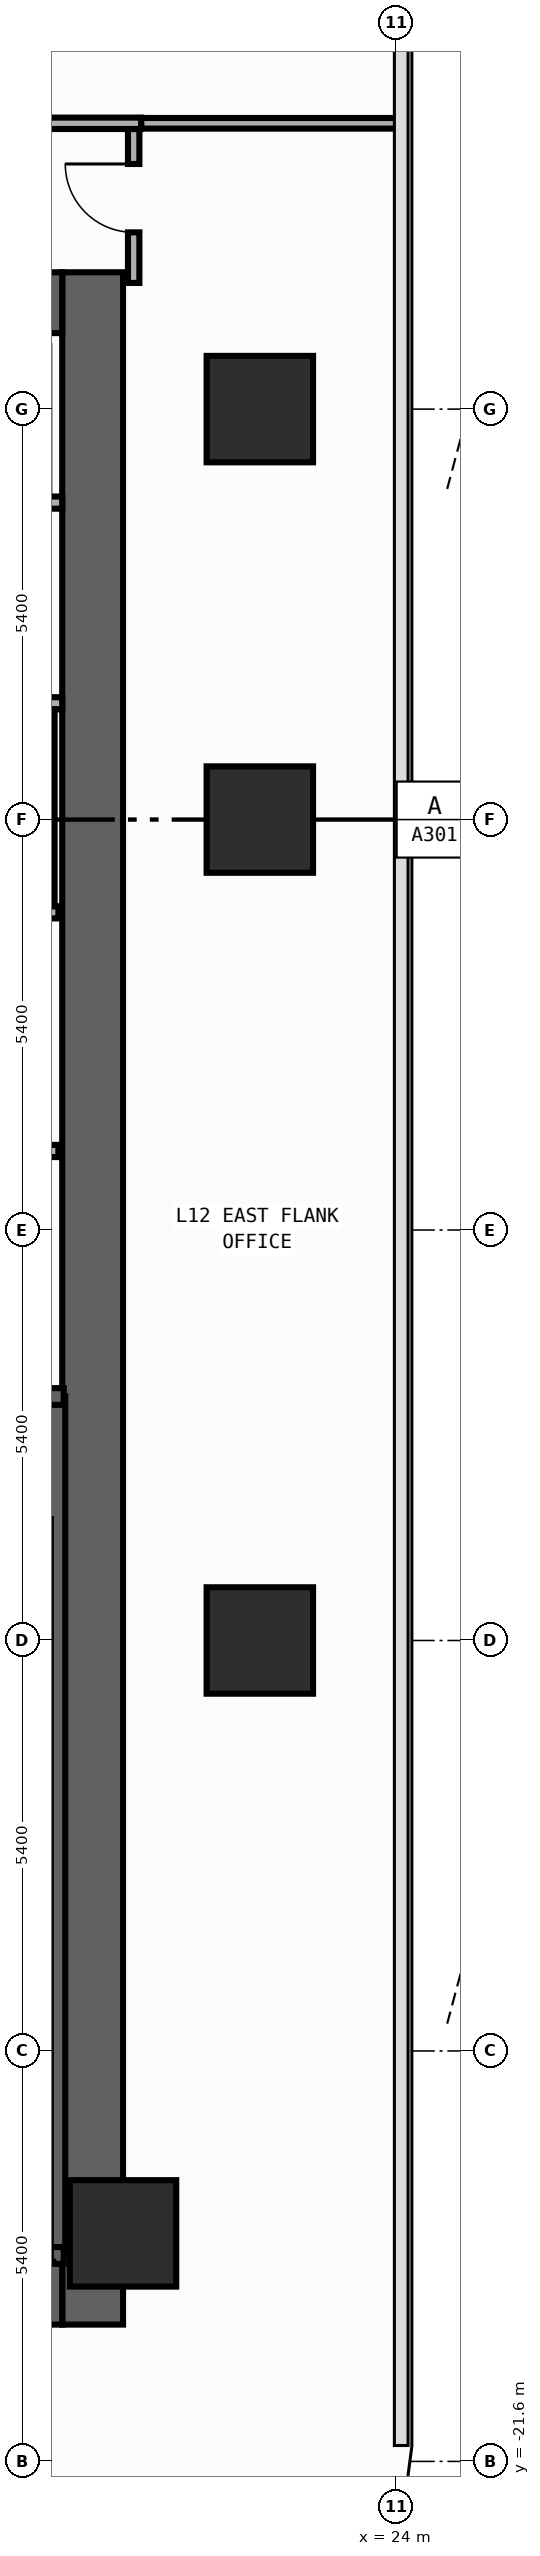
"""IFC4 building model, lengths in metres.
Left out: names, types, materials, properties, quantities, classifications, styles, units other than length and angle.
Written with IfcOpenShell. Run it as: python <this file> out.ifc"""

import sys

from ifc_helpers import new_model, si_unit, direction, frame, frame_2d, origin, origin_2d, place, context, subcontext, project, spatial, rectangle, extrude, element, fill, save


model = new_model("IFC4")
c1 = context("Model", 3, precision=1e-05, world=origin(), true_north=direction((0.0, 1.0)))
c2 = subcontext(c1, "Body", "Model", "MODEL_VIEW")
j1 = project(units=[si_unit("LENGTHUNIT", "METRE"), si_unit("PLANEANGLEUNIT", "RADIAN")], contexts=[c1])
p1 = place(None, origin())
s1 = spatial("IfcSite", under=j1, at=p1, CompositionType="ELEMENT")
p2 = place(p1, origin())
s2 = spatial("IfcBuilding", under=s1, at=p2, CompositionType="ELEMENT")
p3 = place(p2, frame((0.0, 0.0, 51.2)))
s3 = spatial("IfcBuildingStorey", under=s2, at=p3, CompositionType="ELEMENT", Elevation=51.2)
p4 = place(p3, frame((20.0, -19.8, 0.0), z_axis=(0.0, 0.0, 1.0), x_axis=(0.0, 1.0, 0.0)))
e1 = element("IfcWall", 1, at=p4, inside=s3, PredefinedType="SHEAR", context=c2, shape_type="SweptSolid", body=[
    extrude(rectangle(XDim=27.0, YDim=0.8, at=frame_2d((13.5, 0.0))), origin(), (0.0, 0.0, 1.0), 3.94),
])
for number, where, z_axis, x_axis in (
    (2, (12.8, -19.4, 0.0), (0.0, 0.0, 1.0), (1.0, 0.0, 0.0)),
    (3, (12.8, 6.8, 0.0), (0.0, 0.0, 1.0), (1.0, 0.0, 0.0)),
):
    element("IfcWall", number, at=place(p3, frame(where, z_axis=z_axis, x_axis=x_axis)), inside=s3, PredefinedType="SHEAR", context=c2, shape_type="SweptSolid", body=[
        extrude(rectangle(XDim=6.8, YDim=0.8, at=frame_2d((3.4, 0.0))), origin(), (0.0, 0.0, 1.0), 3.94),
    ])
p5 = place(p3, frame((19.53, -18.89, 0.0), z_axis=(0.0, 0.0, 1.0), x_axis=(0.0, 1.0, 0.0)))
e4 = element("IfcWall", 4, at=p5, inside=s3, PredefinedType="SHEAR", context=c2, shape_type="SweptSolid", body=[
    extrude(rectangle(XDim=11.3, YDim=0.22, at=frame_2d((5.65, 0.0))), origin(), (0.0, 0.0, 1.0), 3.94),
])
p6 = place(p3, frame((15.705, -18.89, 0.0), z_axis=(0.0, 0.0, 1.0), x_axis=(1.0, 0.0, 0.0)))
e5 = element("IfcWall", 5, at=p6, inside=s3, PredefinedType="SHEAR", context=c2, shape_type="SweptSolid", body=[
    extrude(rectangle(XDim=3.915, YDim=0.22, at=frame_2d((1.958, 0.0))), origin(), (0.0, 0.0, 1.0), 3.94),
])
p7 = place(p3, frame((19.62, -7.59, 0.0), z_axis=(0.0, 0.0, 1.0), x_axis=(-1.0, 0.0, 0.0)))
e6 = element("IfcWall", 6, at=p7, inside=s3, PredefinedType="SHEAR", context=c2, shape_type="SweptSolid", body=[
    extrude(rectangle(XDim=3.915, YDim=0.22, at=frame_2d((1.958, 0.0))), origin(), (0.0, 0.0, 1.0), 3.94),
])
p8 = place(p7, frame((1.08, 0.0, 0.0)))
e7 = element("IfcOpeningElement", 7, at=p8, cuts=e6, PredefinedType="OPENING", context=c2, shape_type="SweptSolid", body=[
    extrude(rectangle(XDim=1.1, YDim=2.2, at=frame_2d((0.55, 1.1))), frame((0.0, 0.12, 0.0), z_axis=(0.0, -1.0, 0.0), x_axis=(1.0, 0.0, 0.0)), (0.0, 0.0, 1.0), 0.24),
])
for number, where, z_axis, x_axis in (
    (8, (20.4, -18.6, 0.0), (0.0, 0.0, 1.0), (1.0, 0.0, 0.0)),
    (9, (22.2, -10.8, 0.0), (0.0, 0.0, 1.0), (1.0, 0.0, 0.0)),
    (10, (22.2, 0.0, 0.0), (0.0, 0.0, 1.0), (1.0, 0.0, 0.0)),
    (11, (22.2, 5.4, 0.0), (0.0, 0.0, 1.0), (1.0, 0.0, 0.0)),
):
    element("IfcColumn", number, at=place(p3, frame(where, z_axis=z_axis, x_axis=x_axis)), inside=s3, PredefinedType="COLUMN", context=c2, shape_type="SweptSolid", body=[
        extrude(rectangle(XDim=1.4, YDim=1.4, at=origin_2d()), origin(), (0.0, 0.0, 1.0), 4.2),
    ])
p9 = place(p3, frame((15.75, -4.36, 0.0), z_axis=(0.0, 0.0, 1.0), x_axis=(1.0, 0.0, 0.0)))
e12 = element("IfcWall", 12, at=p9, inside=s3, PredefinedType="STANDARD", context=c2, shape_type="SweptSolid", body=[
    extrude(rectangle(XDim=3.8, YDim=0.16, at=frame_2d((1.9, 0.0))), origin(), (0.0, 0.0, 1.0), 3.94),
])
p10 = place(p9, frame((1.47, 0.0, 0.0)))
e13 = element("IfcOpeningElement", 13, at=p10, cuts=e12, PredefinedType="OPENING", context=c2, shape_type="SweptSolid", body=[
    extrude(rectangle(XDim=1.15, YDim=2.2, at=frame_2d((0.575, 1.1))), frame((0.0, 0.09, 0.0), z_axis=(0.0, -1.0, 0.0), x_axis=(1.0, 0.0, 0.0)), (0.0, 0.0, 1.0), 0.18),
])
p11 = place(p3, frame((15.75, -1.22, 0.0), z_axis=(0.0, 0.0, 1.0), x_axis=(1.0, 0.0, 0.0)))
e14 = element("IfcWall", 14, at=p11, inside=s3, PredefinedType="STANDARD", context=c2, shape_type="SweptSolid", body=[
    extrude(rectangle(XDim=3.8, YDim=0.16, at=frame_2d((1.9, 0.0))), origin(), (0.0, 0.0, 1.0), 3.94),
])
for number, where, z_axis, x_axis in (
    (15, (17.31, 4.17, 0.0), (0.0, 0.0, 1.0), (1.0, 0.0, 0.0)),
    (16, (17.31, 1.53, 0.0), (0.0, 0.0, 1.0), (1.0, 0.0, 0.0)),
):
    element("IfcWall", number, at=place(p3, frame(where, z_axis=z_axis, x_axis=x_axis)), inside=s3, PredefinedType="PARTITIONING", context=c2, shape_type="SweptSolid", body=[
        extrude(rectangle(XDim=2.29, YDim=0.16, at=frame_2d((1.145, 0.0))), origin(), (0.0, 0.0, 1.0), 3.94),
    ])
p12 = place(p3, frame((20.54, 7.06, 0.0), z_axis=(0.0, 0.0, 1.0), x_axis=(0.0, 1.0, 0.0)))
e17 = element("IfcWall", 17, at=p12, inside=s3, PredefinedType="PARTITIONING", context=c2, shape_type="SweptSolid", body=[
    extrude(rectangle(XDim=2.025, YDim=0.15, at=frame_2d((1.012, 0.0))), origin(), (0.0, 0.0, 1.0), 3.94),
])
p13 = place(p12, frame((0.665, 0.0, 0.0)))
e18 = element("IfcOpeningElement", 18, at=p13, cuts=e17, PredefinedType="OPENING", context=c2, shape_type="SweptSolid", body=[
    extrude(rectangle(XDim=0.9, YDim=2.15, at=frame_2d((0.45, 1.075))), frame((0.0, 0.085, 0.0), z_axis=(0.0, -1.0, 0.0), x_axis=(1.0, 0.0, 0.0)), (0.0, 0.0, 1.0), 0.17),
])
p14 = place(p3, frame((11.81, 9.16, 0.0), z_axis=(0.0, 0.0, 1.0), x_axis=(1.0, 0.0, 0.0)))
e19 = element("IfcWall", 19, at=p14, inside=s3, PredefinedType="PARTITIONING", context=c2, shape_type="SweptSolid", body=[
    extrude(rectangle(XDim=8.83, YDim=0.15, at=frame_2d((4.415, 0.0))), origin(), (0.0, 0.0, 1.0), 3.94),
])
p15 = place(p14, frame((5.067, 0.0, 0.0)))
e20 = element("IfcOpeningElement", 20, at=p15, cuts=e19, PredefinedType="OPENING", context=c2, shape_type="SweptSolid", body=[
    extrude(rectangle(XDim=0.9, YDim=2.15, at=frame_2d((0.45, 1.075))), frame((0.0, 0.085, 0.0), z_axis=(0.0, -1.0, 0.0), x_axis=(1.0, 0.0, 0.0)), (0.0, 0.0, 1.0), 0.17),
])
p16 = place(p3, frame((20.64, 9.16, 0.0), z_axis=(0.0, 0.0, 1.0), x_axis=(1.0, 0.0, 0.0)))
e21 = element("IfcWall", 21, at=p16, inside=s3, PredefinedType="PARTITIONING", context=c2, shape_type="SweptSolid", body=[
    extrude(rectangle(XDim=3.415, YDim=0.14, at=frame_2d((1.708, 0.0))), origin(), (0.0, 0.0, 1.0), 3.94),
])
p17 = place(p3, frame((19.45, 1.45, 0.0), z_axis=(0.0, 0.0, 1.0), x_axis=(0.0, -1.0, 0.0)))
e22 = element("IfcWall", 22, at=p17, inside=s3, PredefinedType="PARTITIONING", context=c2, shape_type="SweptSolid", body=[
    extrude(rectangle(XDim=2.59, YDim=0.1, at=frame_2d((1.295, 0.0))), origin(), (0.0, 0.0, 1.0), 3.94),
])
p18 = place(p13, origin())
e23 = element("IfcDoor", 23, at=p18, inside=s3, OperationType="SINGLE_SWING_RIGHT", PredefinedType="DOOR", context=c2, shape_type="SweptSolid", body=[
    extrude(rectangle(XDim=0.9, YDim=2.15, at=frame_2d((0.45, 1.075))), frame((0.0, 0.025, 0.0), z_axis=(0.0, -1.0, 0.0), x_axis=(1.0, 0.0, 0.0)), (0.0, 0.0, 1.0), 0.05),
])
fill(e18, e23)
save(model, sys.argv[1])
